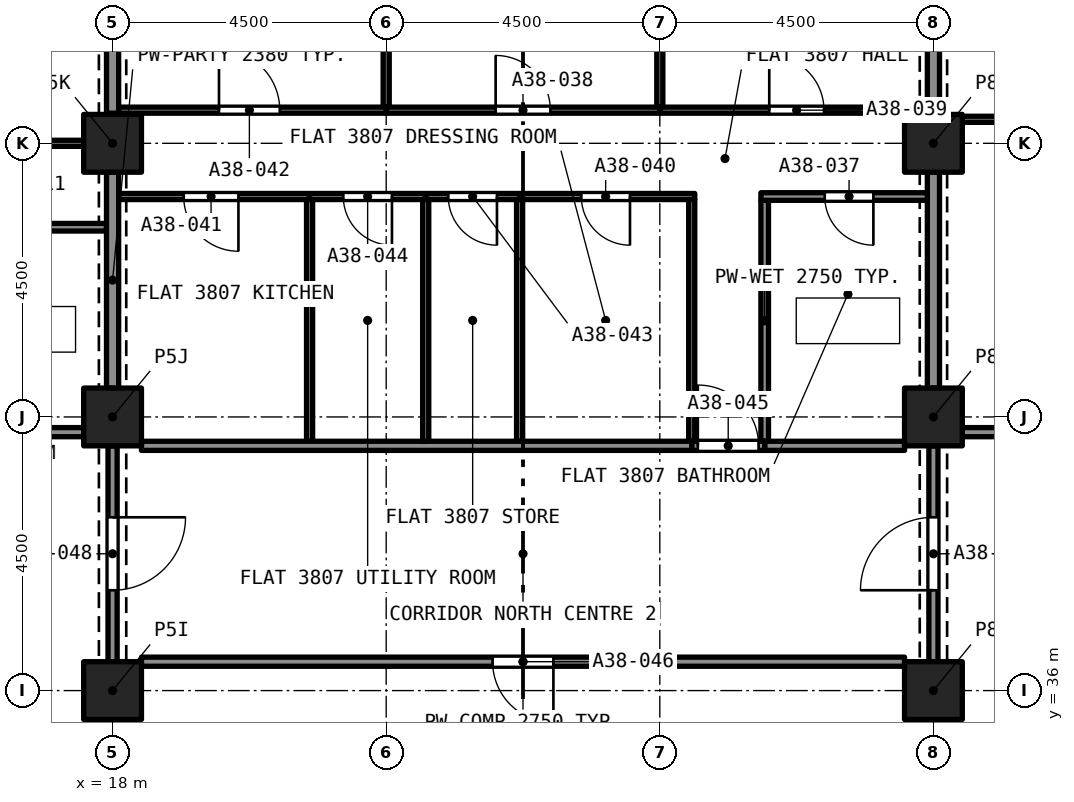
"""IFC4 building model, lengths in metres.
Left out: names, types, materials, properties, quantities, classifications, styles, units other than length and angle.
Written with IfcOpenShell. Run it as: python <this file> out.ifc"""

import sys

from ifc_helpers import new_model, si_unit, direction, frame, frame_2d, origin, origin_2d, place, context, subcontext, project, spatial, rectangle, extrude, element, fill, save


model = new_model("IFC4")
c1 = context("Model", 3, precision=1e-05, world=origin(), true_north=direction((0.0, 1.0)))
c2 = subcontext(c1, "Body", "Model", "MODEL_VIEW")
j1 = project(units=[si_unit("LENGTHUNIT", "METRE"), si_unit("PLANEANGLEUNIT", "RADIAN")], contexts=[c1])
p1 = place(None, origin())
s1 = spatial("IfcSite", under=j1, at=p1, CompositionType="ELEMENT")
p2 = place(p1, origin())
s2 = spatial("IfcBuilding", under=s1, at=p2, CompositionType="ELEMENT")
p3 = place(p2, frame((0.0, 0.0, 136.6)))
s3 = spatial("IfcBuildingStorey", under=s2, at=p3, CompositionType="ELEMENT", Elevation=136.6)
for number, where, z_axis, x_axis in (
    (1, (18.0, 36.0, 0.0), (0.0, 0.0, 1.0), (1.0, 0.0, 0.0)),
    (2, (31.5, 36.0, 0.0), (0.0, 0.0, 1.0), (1.0, 0.0, 0.0)),
    (3, (18.0, 40.5, 0.0), (0.0, 0.0, 1.0), (1.0, 0.0, 0.0)),
    (4, (31.5, 40.5, 0.0), (0.0, 0.0, 1.0), (1.0, 0.0, 0.0)),
    (5, (18.0, 45.0, 0.0), (0.0, 0.0, 1.0), (1.0, 0.0, 0.0)),
    (6, (31.5, 45.0, 0.0), (0.0, 0.0, 1.0), (1.0, 0.0, 0.0)),
):
    element("IfcColumn", number, at=place(p3, frame(where, z_axis=z_axis, x_axis=x_axis)), inside=s3, PredefinedType="COLUMN", context=c2, shape_type="SweptSolid", body=[
        extrude(rectangle(XDim=0.95, YDim=0.95, at=origin_2d()), origin(), (0.0, 0.0, 1.0), 3.2),
    ])
p4 = place(p3, frame((17.9, 43.62, 0.0), z_axis=(0.0, 0.0, 1.0), x_axis=(-1.0, 0.0, 0.0)))
e7 = element("IfcWall", 7, at=p4, inside=s3, PredefinedType="PARTITIONING", context=c2, shape_type="SweptSolid", body=[
    extrude(rectangle(XDim=2.781, YDim=0.125, at=frame_2d((1.39, 0.0))), origin(), (0.0, 0.0, 1.0), 2.9),
])
p5 = place(p4, frame((0.94, 0.0, 0.0)))
e8 = element("IfcOpeningElement", 8, at=p5, cuts=e7, PredefinedType="OPENING", context=c2, shape_type="SweptSolid", body=[
    extrude(rectangle(XDim=0.8, YDim=2.1, at=frame_2d((0.4, 1.05))), frame((0.0, 0.073, 0.0), z_axis=(0.0, -1.0, 0.0), x_axis=(1.0, 0.0, 0.0)), (0.0, 0.0, 1.0), 0.145),
])
p6 = place(p3, frame((18.0, 40.975, 0.0), z_axis=(0.0, 0.0, 1.0), x_axis=(0.0, 1.0, 0.0)))
e9 = element("IfcWall", 9, at=p6, inside=s3, PredefinedType="PARTITIONING", context=c2, shape_type="SweptSolid", body=[
    extrude(rectangle(XDim=3.55, YDim=0.2, at=frame_2d((1.775, 0.0))), origin(), (0.0, 0.0, 1.0), 2.38),
])
p7 = place(p3, frame((13.5, 45.0, 0.0), z_axis=(0.0, 0.0, 1.0), x_axis=(1.0, 0.0, 0.0)))
e10 = element("IfcWall", 10, at=p7, inside=s3, PredefinedType="PARTITIONING", context=c2, shape_type="SweptSolid", body=[
    extrude(rectangle(XDim=4.025, YDim=0.1, at=frame_2d((2.012, 0.0))), origin(), (0.0, 0.0, 1.0), 2.9),
])
p8 = place(p7, frame((1.8, 0.0, 0.0)))
e11 = element("IfcOpeningElement", 11, at=p8, cuts=e10, PredefinedType="OPENING", context=c2, shape_type="SweptSolid", body=[
    extrude(rectangle(XDim=0.9, YDim=2.1, at=frame_2d((0.45, 1.05))), frame((0.0, 0.06, 0.0), z_axis=(0.0, -1.0, 0.0), x_axis=(1.0, 0.0, 0.0)), (0.0, 0.0, 1.0), 0.12),
])
p9 = place(p3, frame((18.0, 45.495, 0.0), z_axis=(0.0, 0.0, 1.0), x_axis=(0.0, 1.0, 0.0)))
e12 = element("IfcWall", 12, at=p9, inside=s3, PredefinedType="PARTITIONING", context=c2, shape_type="SweptSolid", body=[
    extrude(rectangle(XDim=3.53, YDim=0.2, at=frame_2d((1.765, 0.0))), origin(), (0.0, 0.0, 1.0), 2.38),
])
p10 = place(p3, frame((13.25, 40.25, 0.0), z_axis=(0.0, 0.0, 1.0), x_axis=(1.0, 0.0, 0.0)))
e13 = element("IfcWall", 13, at=p10, inside=s3, PredefinedType="PARTITIONING", context=c2, shape_type="SweptSolid", body=[
    extrude(rectangle(XDim=4.275, YDim=0.15, at=frame_2d((2.137, 0.0))), origin(), (0.0, 0.0, 1.0), 2.9),
])
p11 = place(p3, frame((31.975, 45.395, 0.0), z_axis=(0.0, 0.0, 1.0), x_axis=(1.0, 0.0, 0.0)))
e14 = element("IfcWall", 14, at=p11, inside=s3, PredefinedType="PARTITIONING", context=c2, shape_type="SweptSolid", body=[
    extrude(rectangle(XDim=4.025, YDim=0.1, at=frame_2d((2.012, 0.0))), origin(), (0.0, 0.0, 1.0), 2.9),
])
p12 = place(p11, frame((1.275, 0.0, 0.0)))
e15 = element("IfcOpeningElement", 15, at=p12, cuts=e14, PredefinedType="OPENING", context=c2, shape_type="SweptSolid", body=[
    extrude(rectangle(XDim=1.0, YDim=2.1, at=frame_2d((0.5, 1.05))), frame((0.0, 0.06, 0.0), z_axis=(0.0, -1.0, 0.0), x_axis=(1.0, 0.0, 0.0)), (0.0, 0.0, 1.0), 0.12),
])
p13 = place(p3, frame((31.5, 40.975, 0.0), z_axis=(0.0, 0.0, 1.0), x_axis=(0.0, 1.0, 0.0)))
e16 = element("IfcWall", 16, at=p13, inside=s3, PredefinedType="PARTITIONING", context=c2, shape_type="SweptSolid", body=[
    extrude(rectangle(XDim=3.55, YDim=0.2, at=frame_2d((1.775, 0.0))), origin(), (0.0, 0.0, 1.0), 2.38),
])
p14 = place(p3, frame((31.975, 40.25, 0.0), z_axis=(0.0, 0.0, 1.0), x_axis=(1.0, 0.0, 0.0)))
e17 = element("IfcWall", 17, at=p14, inside=s3, PredefinedType="PARTITIONING", context=c2, shape_type="SweptSolid", body=[
    extrude(rectangle(XDim=2.375, YDim=0.15, at=frame_2d((1.188, 0.0))), origin(), (0.0, 0.0, 1.0), 2.9),
])
p15 = place(p14, frame((1.245, 0.0, 0.0)))
e18 = element("IfcOpeningElement", 18, at=p15, cuts=e17, PredefinedType="OPENING", context=c2, shape_type="SweptSolid", body=[
    extrude(rectangle(XDim=1.0, YDim=2.1, at=frame_2d((0.5, 1.05))), frame((0.0, 0.085, 0.0), z_axis=(0.0, -1.0, 0.0), x_axis=(1.0, 0.0, 0.0)), (0.0, 0.0, 1.0), 0.17),
])
p16 = place(p3, frame((31.5, 45.495, 0.0), z_axis=(0.0, 0.0, 1.0), x_axis=(0.0, 1.0, 0.0)))
e19 = element("IfcWall", 19, at=p16, inside=s3, PredefinedType="PARTITIONING", context=c2, shape_type="SweptSolid", body=[
    extrude(rectangle(XDim=3.53, YDim=0.2, at=frame_2d((1.765, 0.0))), origin(), (0.0, 0.0, 1.0), 2.38),
])
p17 = place(p3, frame((28.725, 40.1, 0.0), z_axis=(0.0, 0.0, 1.0), x_axis=(0.0, 1.0, 0.0)))
e20 = element("IfcWall", 20, at=p17, inside=s3, PredefinedType="PARTITIONING", context=c2, shape_type="SweptSolid", body=[
    extrude(rectangle(XDim=3.962, YDim=0.125, at=frame_2d((1.981, 0.0))), origin(), (0.0, 0.0, 1.0), 2.75),
])
p18 = place(p3, frame((31.4, 44.125, 0.0), z_axis=(0.0, 0.0, 1.0), x_axis=(-1.0, 0.0, 0.0)))
e21 = element("IfcWall", 21, at=p18, inside=s3, PredefinedType="PARTITIONING", context=c2, shape_type="SweptSolid", body=[
    extrude(rectangle(XDim=2.737, YDim=0.125, at=frame_2d((1.369, 0.0))), origin(), (0.0, 0.0, 1.0), 2.75),
])
p19 = place(p18, frame((0.887, 0.0, 0.0)))
e22 = element("IfcOpeningElement", 22, at=p19, cuts=e21, PredefinedType="OPENING", context=c2, shape_type="SweptSolid", body=[
    extrude(rectangle(XDim=0.8, YDim=2.1, at=frame_2d((0.4, 1.05))), frame((0.0, 0.073, 0.0), z_axis=(0.0, -1.0, 0.0), x_axis=(1.0, 0.0, 0.0)), (0.0, 0.0, 1.0), 0.145),
])
p20 = place(p3, frame((28.725, 40.025, 0.0), z_axis=(0.0, 0.0, 1.0), x_axis=(1.0, 0.0, 0.0)))
e23 = element("IfcWall", 23, at=p20, inside=s3, PredefinedType="PARTITIONING", context=c2, shape_type="SweptSolid", body=[
    extrude(rectangle(XDim=2.3, YDim=0.15, at=frame_2d((1.15, 0.0))), origin(), (0.0, 0.0, 1.0), 2.75),
])
p21 = place(p3, frame((27.0, 45.595, 0.0), z_axis=(0.0, 0.0, 1.0), x_axis=(0.0, 1.0, 0.0)))
e24 = element("IfcWall", 24, at=p21, inside=s3, PredefinedType="PARTITIONING", context=c2, shape_type="SweptSolid", body=[
    extrude(rectangle(XDim=3.43, YDim=0.1, at=frame_2d((1.715, 0.0))), origin(), (0.0, 0.0, 1.0), 2.75),
])
p22 = place(p3, frame((22.5, 45.545, 0.0), z_axis=(0.0, 0.0, 1.0), x_axis=(1.0, 0.0, 0.0)))
e25 = element("IfcWall", 25, at=p22, inside=s3, PredefinedType="PARTITIONING", context=c2, shape_type="SweptSolid", body=[
    extrude(rectangle(XDim=4.5, YDim=0.1, at=frame_2d((2.25, 0.0))), origin(), (0.0, 0.0, 1.0), 2.75),
])
p23 = place(p22, frame((1.8, 0.0, 0.0)))
e26 = element("IfcOpeningElement", 26, at=p23, cuts=e25, PredefinedType="OPENING", context=c2, shape_type="SweptSolid", body=[
    extrude(rectangle(XDim=0.9, YDim=2.1, at=frame_2d((0.45, 1.05))), frame((0.0, 0.06, 0.0), z_axis=(0.0, -1.0, 0.0), x_axis=(1.0, 0.0, 0.0)), (0.0, 0.0, 1.0), 0.12),
])
p24 = place(p3, frame((22.5, 45.595, 0.0), z_axis=(0.0, 0.0, 1.0), x_axis=(0.0, 1.0, 0.0)))
e27 = element("IfcWall", 27, at=p24, inside=s3, PredefinedType="PARTITIONING", context=c2, shape_type="SweptSolid", body=[
    extrude(rectangle(XDim=3.43, YDim=0.1, at=frame_2d((1.715, 0.0))), origin(), (0.0, 0.0, 1.0), 2.75),
])
p25 = place(p3, frame((27.0, 45.545, 0.0), z_axis=(0.0, 0.0, 1.0), x_axis=(1.0, 0.0, 0.0)))
e28 = element("IfcWall", 28, at=p25, inside=s3, PredefinedType="PARTITIONING", context=c2, shape_type="SweptSolid", body=[
    extrude(rectangle(XDim=4.4, YDim=0.1, at=frame_2d((2.2, 0.0))), origin(), (0.0, 0.0, 1.0), 2.75),
])
p26 = place(p25, frame((1.8, 0.0, 0.0)))
e29 = element("IfcOpeningElement", 29, at=p26, cuts=e28, PredefinedType="OPENING", context=c2, shape_type="SweptSolid", body=[
    extrude(rectangle(XDim=0.9, YDim=2.1, at=frame_2d((0.45, 1.05))), frame((0.0, 0.06, 0.0), z_axis=(0.0, -1.0, 0.0), x_axis=(1.0, 0.0, 0.0)), (0.0, 0.0, 1.0), 0.12),
])
p27 = place(p3, frame((27.575, 44.125, 0.0), z_axis=(0.0, 0.0, 1.0), x_axis=(-1.0, 0.0, 0.0)))
e30 = element("IfcWall", 30, at=p27, inside=s3, PredefinedType="PARTITIONING", context=c2, shape_type="SweptSolid", body=[
    extrude(rectangle(XDim=2.881, YDim=0.1, at=frame_2d((1.44, 0.0))), origin(), (0.0, 0.0, 1.0), 2.75),
])
p28 = place(p27, frame((1.066, 0.0, 0.0)))
e31 = element("IfcOpeningElement", 31, at=p28, cuts=e30, PredefinedType="OPENING", context=c2, shape_type="SweptSolid", body=[
    extrude(rectangle(XDim=0.8, YDim=2.1, at=frame_2d((0.4, 1.05))), frame((0.0, 0.06, 0.0), z_axis=(0.0, -1.0, 0.0), x_axis=(1.0, 0.0, 0.0)), (0.0, 0.0, 1.0), 0.12),
])
for number, where, z_axis, x_axis in (
    (32, (27.525, 40.1, 0.0), (0.0, 0.0, 1.0), (0.0, 1.0, 0.0)),
    (33, (24.694, 40.1, 0.0), (0.0, 0.0, 1.0), (0.0, 1.0, 0.0)),
):
    element("IfcWall", number, at=place(p3, frame(where, z_axis=z_axis, x_axis=x_axis)), inside=s3, PredefinedType="PARTITIONING", context=c2, shape_type="SweptSolid", body=[
        extrude(rectangle(XDim=3.975, YDim=0.1, at=frame_2d((1.987, 0.0))), origin(), (0.0, 0.0, 1.0), 2.75),
    ])
p29 = place(p3, frame((21.24, 44.125, 0.0), z_axis=(0.0, 0.0, 1.0), x_axis=(-1.0, 0.0, 0.0)))
e34 = element("IfcWall", 34, at=p29, inside=s3, PredefinedType="PARTITIONING", context=c2, shape_type="SweptSolid", body=[
    extrude(rectangle(XDim=3.14, YDim=0.1, at=frame_2d((1.57, 0.0))), origin(), (0.0, 0.0, 1.0), 2.75),
])
p30 = place(p29, frame((1.17, 0.0, 0.0)))
e35 = element("IfcOpeningElement", 35, at=p30, cuts=e34, PredefinedType="OPENING", context=c2, shape_type="SweptSolid", body=[
    extrude(rectangle(XDim=0.9, YDim=2.1, at=frame_2d((0.45, 1.05))), frame((0.0, 0.06, 0.0), z_axis=(0.0, -1.0, 0.0), x_axis=(1.0, 0.0, 0.0)), (0.0, 0.0, 1.0), 0.12),
])
p31 = place(p3, frame((18.1, 45.545, 0.0), z_axis=(0.0, 0.0, 1.0), x_axis=(1.0, 0.0, 0.0)))
e36 = element("IfcWall", 36, at=p31, inside=s3, PredefinedType="PARTITIONING", context=c2, shape_type="SweptSolid", body=[
    extrude(rectangle(XDim=4.4, YDim=0.1, at=frame_2d((2.2, 0.0))), origin(), (0.0, 0.0, 1.0), 2.75),
])
p32 = place(p31, frame((1.65, 0.0, 0.0)))
e37 = element("IfcOpeningElement", 37, at=p32, cuts=e36, PredefinedType="OPENING", context=c2, shape_type="SweptSolid", body=[
    extrude(rectangle(XDim=1.0, YDim=2.1, at=frame_2d((0.5, 1.05))), frame((0.0, 0.06, 0.0), z_axis=(0.0, -1.0, 0.0), x_axis=(1.0, 0.0, 0.0)), (0.0, 0.0, 1.0), 0.12),
])
p33 = place(p3, frame((24.694, 44.125, 0.0), z_axis=(0.0, 0.0, 1.0), x_axis=(-1.0, 0.0, 0.0)))
e38 = element("IfcWall", 38, at=p33, inside=s3, PredefinedType="PARTITIONING", context=c2, shape_type="SweptSolid", body=[
    extrude(rectangle(XDim=1.544, YDim=0.1, at=frame_2d((0.772, 0.0))), origin(), (0.0, 0.0, 1.0), 2.75),
])
p34 = place(p33, frame((0.372, 0.0, 0.0)))
e39 = element("IfcOpeningElement", 39, at=p34, cuts=e38, PredefinedType="OPENING", context=c2, shape_type="SweptSolid", body=[
    extrude(rectangle(XDim=0.8, YDim=2.1, at=frame_2d((0.4, 1.05))), frame((0.0, 0.06, 0.0), z_axis=(0.0, -1.0, 0.0), x_axis=(1.0, 0.0, 0.0)), (0.0, 0.0, 1.0), 0.12),
])
p35 = place(p3, frame((23.15, 44.125, 0.0), z_axis=(0.0, 0.0, 1.0), x_axis=(-1.0, 0.0, 0.0)))
e40 = element("IfcWall", 40, at=p35, inside=s3, PredefinedType="PARTITIONING", context=c2, shape_type="SweptSolid", body=[
    extrude(rectangle(XDim=1.91, YDim=0.1, at=frame_2d((0.955, 0.0))), origin(), (0.0, 0.0, 1.0), 2.75),
])
p36 = place(p35, frame((0.555, 0.0, 0.0)))
e41 = element("IfcOpeningElement", 41, at=p36, cuts=e40, PredefinedType="OPENING", context=c2, shape_type="SweptSolid", body=[
    extrude(rectangle(XDim=0.8, YDim=2.1, at=frame_2d((0.4, 1.05))), frame((0.0, 0.06, 0.0), z_axis=(0.0, -1.0, 0.0), x_axis=(1.0, 0.0, 0.0)), (0.0, 0.0, 1.0), 0.12),
])
p37 = place(p3, frame((27.525, 40.025, 0.0), z_axis=(0.0, 0.0, 1.0), x_axis=(1.0, 0.0, 0.0)))
e42 = element("IfcWall", 42, at=p37, inside=s3, PredefinedType="PARTITIONING", context=c2, shape_type="SweptSolid", body=[
    extrude(rectangle(XDim=1.2, YDim=0.15, at=frame_2d((0.6, 0.0))), origin(), (0.0, 0.0, 1.0), 2.75),
])
p38 = place(p37, frame((0.1, 0.0, 0.0)))
e43 = element("IfcOpeningElement", 43, at=p38, cuts=e42, PredefinedType="OPENING", context=c2, shape_type="SweptSolid", body=[
    extrude(rectangle(XDim=1.0, YDim=2.1, at=frame_2d((0.5, 1.05))), frame((0.0, 0.085, 0.0), z_axis=(0.0, -1.0, 0.0), x_axis=(1.0, 0.0, 0.0)), (0.0, 0.0, 1.0), 0.17),
])
p39 = place(p3, frame((21.24, 40.1, 0.0), z_axis=(0.0, 0.0, 1.0), x_axis=(0.0, 1.0, 0.0)))
e44 = element("IfcWall", 44, at=p39, inside=s3, PredefinedType="PARTITIONING", context=c2, shape_type="SweptSolid", body=[
    extrude(rectangle(XDim=3.975, YDim=0.1, at=frame_2d((1.987, 0.0))), origin(), (0.0, 0.0, 1.0), 2.75),
])
p40 = place(p3, frame((18.475, 40.025, 0.0), z_axis=(0.0, 0.0, 1.0), x_axis=(1.0, 0.0, 0.0)))
e45 = element("IfcWall", 45, at=p40, inside=s3, PredefinedType="PARTITIONING", context=c2, shape_type="SweptSolid", body=[
    extrude(rectangle(XDim=9.05, YDim=0.15, at=frame_2d((4.525, 0.0))), origin(), (0.0, 0.0, 1.0), 2.75),
])
p41 = place(p3, frame((23.15, 40.1, 0.0), z_axis=(0.0, 0.0, 1.0), x_axis=(0.0, 1.0, 0.0)))
e46 = element("IfcWall", 46, at=p41, inside=s3, PredefinedType="PARTITIONING", context=c2, shape_type="SweptSolid", body=[
    extrude(rectangle(XDim=3.975, YDim=0.1, at=frame_2d((1.987, 0.0))), origin(), (0.0, 0.0, 1.0), 2.75),
])
p42 = place(p3, frame((31.025, 36.475, 0.0), z_axis=(0.0, 0.0, 1.0), x_axis=(-1.0, 0.0, 0.0)))
e47 = element("IfcWall", 47, at=p42, inside=s3, PredefinedType="PARTITIONING", context=c2, shape_type="SweptSolid", body=[
    extrude(rectangle(XDim=12.55, YDim=0.15, at=frame_2d((6.275, 0.0))), origin(), (0.0, 0.0, 1.0), 2.75),
])
p43 = place(p42, frame((5.775, 0.0, 0.0)))
e48 = element("IfcOpeningElement", 48, at=p43, cuts=e47, PredefinedType="OPENING", context=c2, shape_type="SweptSolid", body=[
    extrude(rectangle(XDim=1.0, YDim=2.1, at=frame_2d((0.5, 1.05))), frame((0.0, 0.085, 0.0), z_axis=(0.0, -1.0, 0.0), x_axis=(1.0, 0.0, 0.0)), (0.0, 0.0, 1.0), 0.17),
])
p44 = place(p3, frame((31.5, 36.475, 0.0), z_axis=(0.0, 0.0, 1.0), x_axis=(0.0, 1.0, 0.0)))
e49 = element("IfcWall", 49, at=p44, inside=s3, PredefinedType="PARTITIONING", context=c2, shape_type="SweptSolid", body=[
    extrude(rectangle(XDim=3.55, YDim=0.15, at=frame_2d((1.775, 0.0))), origin(), (0.0, 0.0, 1.0), 2.38),
])
p45 = place(p44, frame((1.175, 0.0, 0.0)))
e50 = element("IfcOpeningElement", 50, at=p45, cuts=e49, PredefinedType="OPENING", context=c2, shape_type="SweptSolid", body=[
    extrude(rectangle(XDim=1.2, YDim=2.1, at=frame_2d((0.6, 1.05))), frame((0.0, 0.085, 0.0), z_axis=(0.0, -1.0, 0.0), x_axis=(1.0, 0.0, 0.0)), (0.0, 0.0, 1.0), 0.17),
])
p46 = place(p3, frame((18.0, 40.025, 0.0), z_axis=(0.0, 0.0, 1.0), x_axis=(0.0, -1.0, 0.0)))
e51 = element("IfcWall", 51, at=p46, inside=s3, PredefinedType="PARTITIONING", context=c2, shape_type="SweptSolid", body=[
    extrude(rectangle(XDim=3.55, YDim=0.15, at=frame_2d((1.775, 0.0))), origin(), (0.0, 0.0, 1.0), 2.38),
])
p47 = place(p46, frame((1.175, 0.0, 0.0)))
e52 = element("IfcOpeningElement", 52, at=p47, cuts=e51, PredefinedType="OPENING", context=c2, shape_type="SweptSolid", body=[
    extrude(rectangle(XDim=1.2, YDim=2.1, at=frame_2d((0.6, 1.05))), frame((0.0, 0.085, 0.0), z_axis=(0.0, -1.0, 0.0), x_axis=(1.0, 0.0, 0.0)), (0.0, 0.0, 1.0), 0.17),
])
for number, where, z_axis, x_axis in (
    (53, (31.5, 31.975, 0.0), (0.0, 0.0, 1.0), (0.0, 1.0, 0.0)),
    (54, (18.0, 31.975, 0.0), (0.0, 0.0, 1.0), (0.0, 1.0, 0.0)),
):
    element("IfcWall", number, at=place(p3, frame(where, z_axis=z_axis, x_axis=x_axis)), inside=s3, PredefinedType="PARTITIONING", context=c2, shape_type="SweptSolid", body=[
        extrude(rectangle(XDim=3.55, YDim=0.15, at=frame_2d((1.775, 0.0))), origin(), (0.0, 0.0, 1.0), 2.38),
    ])
p48 = place(p19, origin())
e55 = element("IfcDoor", 55, at=p48, inside=s3, OperationType="SINGLE_SWING_LEFT", PredefinedType="DOOR", context=c2, shape_type="SweptSolid", body=[
    extrude(rectangle(XDim=0.8, YDim=2.1, at=frame_2d((0.4, 1.05))), frame((0.0, 0.025, 0.0), z_axis=(0.0, -1.0, 0.0), x_axis=(1.0, 0.0, 0.0)), (0.0, 0.0, 1.0), 0.05),
])
fill(e22, e55)
p49 = place(p23, origin())
e56 = element("IfcDoor", 56, at=p49, inside=s3, OperationType="SINGLE_SWING_LEFT", PredefinedType="DOOR", context=c2, shape_type="SweptSolid", body=[
    extrude(rectangle(XDim=0.9, YDim=2.1, at=frame_2d((0.45, 1.05))), frame((0.0, 0.025, 0.0), z_axis=(0.0, -1.0, 0.0), x_axis=(1.0, 0.0, 0.0)), (0.0, 0.0, 1.0), 0.05),
])
fill(e26, e56)
p50 = place(p26, origin())
e57 = element("IfcDoor", 57, at=p50, inside=s3, OperationType="SINGLE_SWING_RIGHT", PredefinedType="DOOR", context=c2, shape_type="SweptSolid", body=[
    extrude(rectangle(XDim=0.9, YDim=2.1, at=frame_2d((0.45, 1.05))), frame((0.0, 0.025, 0.0), z_axis=(0.0, -1.0, 0.0), x_axis=(1.0, 0.0, 0.0)), (0.0, 0.0, 1.0), 0.05),
])
fill(e29, e57)
p51 = place(p28, origin())
e58 = element("IfcDoor", 58, at=p51, inside=s3, OperationType="SINGLE_SWING_RIGHT", PredefinedType="DOOR", context=c2, shape_type="SweptSolid", body=[
    extrude(rectangle(XDim=0.8, YDim=2.1, at=frame_2d((0.4, 1.05))), frame((0.0, 0.025, 0.0), z_axis=(0.0, -1.0, 0.0), x_axis=(1.0, 0.0, 0.0)), (0.0, 0.0, 1.0), 0.05),
])
fill(e31, e58)
p52 = place(p30, origin())
e59 = element("IfcDoor", 59, at=p52, inside=s3, OperationType="SINGLE_SWING_RIGHT", PredefinedType="DOOR", context=c2, shape_type="SweptSolid", body=[
    extrude(rectangle(XDim=0.9, YDim=2.1, at=frame_2d((0.45, 1.05))), frame((0.0, 0.025, 0.0), z_axis=(0.0, -1.0, 0.0), x_axis=(1.0, 0.0, 0.0)), (0.0, 0.0, 1.0), 0.05),
])
fill(e35, e59)
p53 = place(p32, origin())
e60 = element("IfcDoor", 60, at=p53, inside=s3, OperationType="SINGLE_SWING_LEFT", PredefinedType="DOOR", context=c2, shape_type="SweptSolid", body=[
    extrude(rectangle(XDim=1.0, YDim=2.1, at=frame_2d((0.5, 1.05))), frame((0.0, 0.025, 0.0), z_axis=(0.0, -1.0, 0.0), x_axis=(1.0, 0.0, 0.0)), (0.0, 0.0, 1.0), 0.05),
])
fill(e37, e60)
p54 = place(p34, origin())
e61 = element("IfcDoor", 61, at=p54, inside=s3, OperationType="SINGLE_SWING_LEFT", PredefinedType="DOOR", context=c2, shape_type="SweptSolid", body=[
    extrude(rectangle(XDim=0.8, YDim=2.1, at=frame_2d((0.4, 1.05))), frame((0.0, 0.025, 0.0), z_axis=(0.0, -1.0, 0.0), x_axis=(1.0, 0.0, 0.0)), (0.0, 0.0, 1.0), 0.05),
])
fill(e39, e61)
p55 = place(p36, origin())
e62 = element("IfcDoor", 62, at=p55, inside=s3, OperationType="SINGLE_SWING_LEFT", PredefinedType="DOOR", context=c2, shape_type="SweptSolid", body=[
    extrude(rectangle(XDim=0.8, YDim=2.1, at=frame_2d((0.4, 1.05))), frame((0.0, 0.025, 0.0), z_axis=(0.0, -1.0, 0.0), x_axis=(1.0, 0.0, 0.0)), (0.0, 0.0, 1.0), 0.05),
])
fill(e41, e62)
p56 = place(p38, origin())
e63 = element("IfcDoor", 63, at=p56, inside=s3, OperationType="SINGLE_SWING_RIGHT", PredefinedType="DOOR", context=c2, shape_type="SweptSolid", body=[
    extrude(rectangle(XDim=1.0, YDim=2.1, at=frame_2d((0.5, 1.05))), frame((0.0, 0.025, 0.0), z_axis=(0.0, -1.0, 0.0), x_axis=(1.0, 0.0, 0.0)), (0.0, 0.0, 1.0), 0.05),
])
fill(e43, e63)
p57 = place(p43, origin())
e64 = element("IfcDoor", 64, at=p57, inside=s3, OperationType="SINGLE_SWING_RIGHT", PredefinedType="DOOR", context=c2, shape_type="SweptSolid", body=[
    extrude(rectangle(XDim=1.0, YDim=2.1, at=frame_2d((0.5, 1.05))), frame((0.0, 0.025, 0.0), z_axis=(0.0, -1.0, 0.0), x_axis=(1.0, 0.0, 0.0)), (0.0, 0.0, 1.0), 0.05),
])
fill(e48, e64)
p58 = place(p45, origin())
e65 = element("IfcDoor", 65, at=p58, inside=s3, OperationType="SINGLE_SWING_LEFT", PredefinedType="DOOR", context=c2, shape_type="SweptSolid", body=[
    extrude(rectangle(XDim=1.2, YDim=2.1, at=frame_2d((0.6, 1.05))), frame((0.0, 0.025, 0.0), z_axis=(0.0, -1.0, 0.0), x_axis=(1.0, 0.0, 0.0)), (0.0, 0.0, 1.0), 0.05),
])
fill(e50, e65)
p59 = place(p47, origin())
e66 = element("IfcDoor", 66, at=p59, inside=s3, OperationType="SINGLE_SWING_LEFT", PredefinedType="DOOR", context=c2, shape_type="SweptSolid", body=[
    extrude(rectangle(XDim=1.2, YDim=2.1, at=frame_2d((0.6, 1.05))), frame((0.0, 0.025, 0.0), z_axis=(0.0, -1.0, 0.0), x_axis=(1.0, 0.0, 0.0)), (0.0, 0.0, 1.0), 0.05),
])
fill(e52, e66)
save(model, sys.argv[1])
